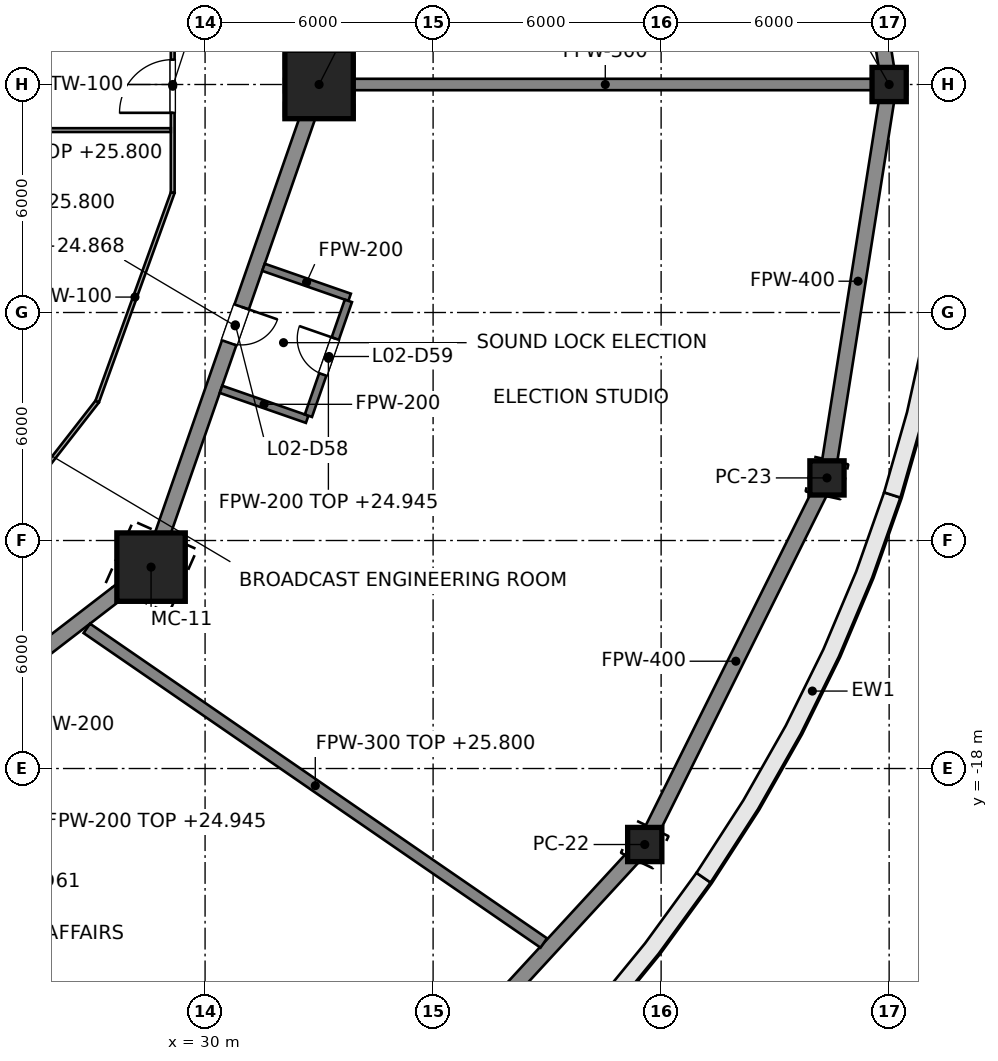
"""IFC4 building model, lengths in metres.
Left out: names, types, materials, properties, quantities, classifications, styles, units other than length and angle.
Written with IfcOpenShell. Run it as: python <this file> out.ifc"""

import sys

from ifc_helpers import new_model, si_unit, direction, frame, frame_2d, origin, origin_2d, place, context, subcontext, project, spatial, polyline, rectangle, hollow_rectangle, outline, extrude, element, fill, save


model = new_model("IFC4")
c1 = context("Model", 3, precision=1e-05, world=origin(), true_north=direction((0.0, 1.0)))
c2 = subcontext(c1, "Body", "Model", "MODEL_VIEW")
j1 = project(units=[si_unit("LENGTHUNIT", "METRE"), si_unit("PLANEANGLEUNIT", "RADIAN")], contexts=[c1])
p1 = place(None, origin())
s1 = spatial("IfcSite", under=j1, at=p1, CompositionType="ELEMENT")
p2 = place(p1, origin())
s2 = spatial("IfcBuilding", under=s1, at=p2, CompositionType="ELEMENT")
p3 = place(p2, frame((0.0, 0.0, 17.0)))
s3 = spatial("IfcBuildingStorey", under=s2, at=p3, CompositionType="ELEMENT", Elevation=17.0)
for number, where, z_axis, x_axis in (
    (1, (33.0, 0.0, 0.0), (0.0, 0.0, 1.0), (1.0, 0.0, 0.0)),
    (2, (28.579, -12.7, 0.0), (0.0, 0.0, 1.0), (0.914, -0.406, 0.0)),
):
    element("IfcColumn", number, at=place(p3, frame(where, z_axis=z_axis, x_axis=x_axis)), inside=s3, PredefinedType="COLUMN", context=c2, shape_type="SweptSolid", body=[
        extrude(hollow_rectangle(XDim=1.8, YDim=1.8, WallThickness=0.08, at=origin_2d()), origin(), (0.0, 0.0, 1.0), 9.0),
    ])
for number, where, z_axis, x_axis in (
    (3, (48.0, 0.0, 0.0), (0.0, 0.0, 1.0), (1.0, 0.0, 0.0)),
    (4, (41.569, -20.0, 0.0), (0.0, 0.0, 1.0), (0.901, -0.434, 0.0)),
    (5, (46.365, -10.353, 0.0), (0.0, 0.0, 1.0), (0.976, -0.218, 0.0)),
):
    element("IfcColumn", number, at=place(p3, frame(where, z_axis=z_axis, x_axis=x_axis)), inside=s3, PredefinedType="COLUMN", context=c2, shape_type="SweptSolid", body=[
        extrude(hollow_rectangle(XDim=0.9, YDim=0.9, WallThickness=0.04, at=origin_2d()), origin(), (0.0, 0.0, 1.0), 9.0),
    ])
p4 = place(p3, origin())
e6 = element("IfcWall", 6, at=p4, inside=s3, PredefinedType="SOLIDWALL", context=c2, shape_type="SweptSolid", body=[
    extrude(outline(polyline([(50.0, 0.0), (49.931, 2.198), (49.726, 4.39), (49.385, 6.57), (48.907, 8.732), (48.296, 10.87), (47.868, 10.734), (48.471, 8.622), (48.942, 6.487), (49.28, 4.334), (49.482, 2.17), (49.55, 0.0), (50.0, 0.0)])), origin(), (0.0, 0.0, 1.0), 8.8),
])
e7 = element("IfcWall", 7, at=p4, inside=s3, PredefinedType="SOLIDWALL", context=c2, shape_type="SweptSolid", body=[
    extrude(outline(polyline([(35.355, -29.698), (37.157, -28.104), (38.857, -26.431), (40.451, -24.687), (41.934, -22.875), (43.301, -21.0), (42.93, -20.745), (41.577, -22.6), (40.11, -24.393), (38.533, -26.119), (36.85, -27.774), (35.066, -29.354), (35.355, -29.698)])), origin(), (0.0, 0.0, 1.0), 8.8),
])
e8 = element("IfcWall", 8, at=p4, inside=s3, PredefinedType="SOLIDWALL", context=c2, shape_type="SweptSolid", body=[
    extrude(outline(polyline([(43.301, -21.0), (44.55, -19.068), (45.677, -17.083), (46.679, -15.052), (47.553, -12.979), (48.296, -10.87), (47.868, -10.734), (47.133, -12.816), (46.27, -14.865), (45.28, -16.872), (44.166, -18.834), (42.93, -20.745), (43.301, -21.0)])), origin(), (0.0, 0.0, 1.0), 8.8),
])
e9 = element("IfcWall", 9, at=p4, inside=s3, PredefinedType="SOLIDWALL", context=c2, shape_type="SweptSolid", body=[
    extrude(outline(polyline([(48.296, -10.87), (48.907, -8.732), (49.385, -6.57), (49.726, -4.39), (49.931, -2.198), (50.0, 0.0), (49.55, 0.0), (49.482, -2.17), (49.28, -4.334), (48.942, -6.487), (48.471, -8.622), (47.868, -10.734), (48.296, -10.87)])), origin(), (0.0, 0.0, 1.0), 8.8),
])
p5 = place(p3, frame((48.0, 0.0, 0.0), z_axis=(0.0, 0.0, 1.0), x_axis=(-0.156041518224, 0.987750497135, 0.0)))
e10 = element("IfcWall", 10, at=p5, inside=s3, PredefinedType="PARTITIONING", context=c2, shape_type="SweptSolid", body=[
    extrude(rectangle(XDim=10.481, YDim=0.4, at=frame_2d((5.241, 0.0))), origin(), (0.0, 0.0, 1.0), 7.877),
])
p6 = place(p3, frame((33.941, -28.284, 0.0), z_axis=(0.0, 0.0, 1.0), x_axis=(0.67736833065, 0.735644033914, 0.0)))
e11 = element("IfcWall", 11, at=p6, inside=s3, PredefinedType="PARTITIONING", context=c2, shape_type="SweptSolid", body=[
    extrude(rectangle(XDim=11.261, YDim=0.4, at=frame_2d((5.631, 0.0))), origin(), (0.0, 0.0, 1.0), 7.877),
])
p7 = place(p3, frame((41.569, -20.0, 0.0), z_axis=(0.0, 0.0, 1.0), x_axis=(0.445118441463, 0.895471704226, 0.0)))
e12 = element("IfcWall", 12, at=p7, inside=s3, PredefinedType="PARTITIONING", context=c2, shape_type="SweptSolid", body=[
    extrude(rectangle(XDim=10.773, YDim=0.4, at=frame_2d((5.387, 0.0))), origin(), (0.0, 0.0, 1.0), 7.877),
])
p8 = place(p3, frame((46.365, -10.353, 0.0), z_axis=(0.0, 0.0, 1.0), x_axis=(0.156041518224, 0.987750497135, 0.0)))
e13 = element("IfcWall", 13, at=p8, inside=s3, PredefinedType="PARTITIONING", context=c2, shape_type="SweptSolid", body=[
    extrude(rectangle(XDim=10.481, YDim=0.4, at=frame_2d((5.241, 0.0))), origin(), (0.0, 0.0, 1.0), 7.877),
])
p9 = place(p3, frame((33.0, 0.0, 0.0), z_axis=(0.0, 0.0, 1.0), x_axis=(-0.328770590399, 0.944409815117, 0.0)))
e14 = element("IfcWall", 14, at=p9, inside=s3, PredefinedType="PARTITIONING", context=c2, shape_type="SweptSolid", body=[
    extrude(rectangle(XDim=13.448, YDim=0.4, at=frame_2d((6.724, 0.0))), origin(), (0.0, 0.0, 1.0), 7.868),
])
p10 = place(p9, frame((6.25, 0.0, 0.0)))
e15 = element("IfcOpeningElement", 15, at=p10, cuts=e14, PredefinedType="OPENING", context=c2, shape_type="SweptSolid", body=[
    extrude(rectangle(XDim=1.0, YDim=2.1, at=frame_2d((0.5, 1.05))), frame((0.0, 0.2, 0.0), z_axis=(0.0, -1.0, 0.0), x_axis=(1.0, 0.0, 0.0)), (0.0, 0.0, 1.0), 0.4),
])
p11 = place(p3, frame((16.5, -21.997, 0.0), z_axis=(0.0, 0.0, 1.0), x_axis=(0.792443539308, 0.609945273782, 0.0)))
e16 = element("IfcWall", 16, at=p11, inside=s3, PredefinedType="PARTITIONING", context=c2, shape_type="SweptSolid", body=[
    extrude(rectangle(XDim=15.242, YDim=0.4, at=frame_2d((7.621, 0.0))), origin(), (0.0, 0.0, 1.0), 7.868),
])
p12 = place(p11, frame((7.15, 0.0, 0.0)))
e17 = element("IfcOpeningElement", 17, at=p12, cuts=e16, PredefinedType="OPENING", context=c2, shape_type="SweptSolid", body=[
    extrude(rectangle(XDim=1.0, YDim=2.1, at=frame_2d((0.5, 1.05))), frame((0.0, 0.2, 0.0), z_axis=(0.0, -1.0, 0.0), x_axis=(1.0, 0.0, 0.0)), (0.0, 0.0, 1.0), 0.4),
])
p13 = place(p3, frame((28.579, -12.7, 0.0), z_axis=(0.0, 0.0, 1.0), x_axis=(0.328770590399, 0.944409815117, 0.0)))
e18 = element("IfcWall", 18, at=p13, inside=s3, PredefinedType="PARTITIONING", context=c2, shape_type="SweptSolid", body=[
    extrude(rectangle(XDim=13.448, YDim=0.4, at=frame_2d((6.724, 0.0))), origin(), (0.0, 0.0, 1.0), 7.868),
])
p14 = place(p13, frame((6.25, 0.0, 0.0)))
e19 = element("IfcOpeningElement", 19, at=p14, cuts=e18, PredefinedType="OPENING", context=c2, shape_type="SweptSolid", body=[
    extrude(rectangle(XDim=1.0, YDim=2.1, at=frame_2d((0.5, 1.05))), frame((0.0, 0.2, 0.0), z_axis=(0.0, -1.0, 0.0), x_axis=(1.0, 0.0, 0.0)), (0.0, 0.0, 1.0), 0.4),
])
p15 = place(p3, frame((23.325, -13.271, 0.0), z_axis=(0.0, 0.0, 1.0), x_axis=(0.614354540541, 0.78903009988, 0.0)))
e20 = element("IfcWall", 20, at=p15, inside=s3, PredefinedType="PARTITIONING", context=c2, shape_type="SweptSolid", body=[
    extrude(rectangle(XDim=6.246, YDim=0.1, at=frame_2d((3.123, 0.0))), origin(), (0.0, 0.0, 1.0), 7.945),
])
p16 = place(p3, frame((27.162, -8.343, 0.0), z_axis=(0.0, 0.0, 1.0), x_axis=(0.339837423604, 0.940484197378, 0.0)))
e21 = element("IfcWall", 21, at=p16, inside=s3, PredefinedType="PARTITIONING", context=c2, shape_type="SweptSolid", body=[
    extrude(rectangle(XDim=5.845, YDim=0.1, at=frame_2d((2.922, 0.0))), origin(), (0.0, 0.0, 1.0), 7.877),
])
p17 = place(p3, frame((29.148, -2.845, 0.0), z_axis=(0.0, 0.0, 1.0), x_axis=(0.0, 1.0, 0.0)))
e22 = element("IfcWall", 22, at=p17, inside=s3, PredefinedType="PARTITIONING", context=c2, shape_type="SweptSolid", body=[
    extrude(rectangle(XDim=5.691, YDim=0.1, at=frame_2d((2.845, 0.0))), origin(), (0.0, 0.0, 1.0), 7.877),
])
p18 = place(p17, frame((2.1, 0.0, 0.0)))
e23 = element("IfcOpeningElement", 23, at=p18, cuts=e22, PredefinedType="OPENING", context=c2, shape_type="SweptSolid", body=[
    extrude(rectangle(XDim=1.4, YDim=2.1, at=frame_2d((0.7, 1.05))), frame((0.0, 0.05, 0.0), z_axis=(0.0, -1.0, 0.0), x_axis=(1.0, 0.0, 0.0)), (0.0, 0.0, 1.0), 0.1),
])
p19 = place(p3, frame((18.05, -1.2, 0.0), z_axis=(0.0, 0.0, 1.0), x_axis=(1.0, 0.0, 0.0)))
e24 = element("IfcWall", 24, at=p19, inside=s3, PredefinedType="PARTITIONING", context=c2, shape_type="SweptSolid", body=[
    extrude(rectangle(XDim=11.048, YDim=0.1, at=frame_2d((5.524, 0.0))), origin(), (0.0, 0.0, 1.0), 8.8),
])
p20 = place(p3, frame((33.264, 0.0, 0.0), z_axis=(0.0, 0.0, 1.0), x_axis=(1.0, 0.0, 0.0)))
e25 = element("IfcWall", 25, at=p20, inside=s3, PredefinedType="PARTITIONING", context=c2, shape_type="SweptSolid", body=[
    extrude(rectangle(XDim=14.534, YDim=0.3, at=frame_2d((7.267, 0.0))), origin(), (0.0, 0.0, 1.0), 8.026),
])
p21 = place(p3, frame((26.888, -14.312, 0.0), z_axis=(0.0, 0.0, 1.0), x_axis=(0.823646474485, -0.567103592889, 0.0)))
e26 = element("IfcWall", 26, at=p21, inside=s3, PredefinedType="PARTITIONING", context=c2, shape_type="SweptSolid", body=[
    extrude(rectangle(XDim=14.598, YDim=0.3, at=frame_2d((7.299, 0.0))), origin(), (0.0, 0.0, 1.0), 8.8),
])
for number, where, z_axis, x_axis in (
    (27, (30.419, -8.021, 0.0), (0.0, 0.0, 1.0), (0.944, -0.329, 0.0)),
    (28, (31.537, -4.81, 0.0), (0.0, 0.0, 1.0), (0.944, -0.329, 0.0)),
):
    element("IfcWall", number, at=place(p3, frame(where, z_axis=z_axis, x_axis=x_axis)), inside=s3, PredefinedType="PARTITIONING", context=c2, shape_type="SweptSolid", body=[
        extrude(rectangle(XDim=2.4, YDim=0.2, at=frame_2d((1.2, 0.0))), origin(), (0.0, 0.0, 1.0), 8.8),
    ])
p22 = place(p3, frame((32.719, -8.716, 0.0), z_axis=(0.0, 0.0, 1.0), x_axis=(0.328742544754, 0.944419577978, 0.0)))
e29 = element("IfcWall", 29, at=p22, inside=s3, PredefinedType="PARTITIONING", context=c2, shape_type="SweptSolid", body=[
    extrude(rectangle(XDim=3.2, YDim=0.2, at=frame_2d((1.6, 0.0))), origin(), (0.0, 0.0, 1.0), 7.945),
])
p23 = place(p22, frame((1.15, 0.0, 0.0)))
e30 = element("IfcOpeningElement", 30, at=p23, cuts=e29, PredefinedType="OPENING", context=c2, shape_type="SweptSolid", body=[
    extrude(rectangle(XDim=1.0, YDim=2.1, at=frame_2d((0.5, 1.05))), frame((0.0, 0.1, 0.0), z_axis=(0.0, -1.0, 0.0), x_axis=(1.0, 0.0, 0.0)), (0.0, 0.0, 1.0), 0.2),
])
p24 = place(p18, origin())
e31 = element("IfcDoor", 31, at=p24, inside=s3, OperationType="SINGLE_SWING_LEFT", PredefinedType="DOOR", context=c2, shape_type="SweptSolid", body=[
    extrude(rectangle(XDim=1.4, YDim=2.1, at=frame_2d((0.7, 1.05))), frame((0.0, 0.025, 0.0), z_axis=(0.0, -1.0, 0.0), x_axis=(1.0, 0.0, 0.0)), (0.0, 0.0, 1.0), 0.05),
])
fill(e23, e31)
p25 = place(p14, origin())
e32 = element("IfcDoor", 32, at=p25, inside=s3, OperationType="SINGLE_SWING_RIGHT", PredefinedType="DOOR", context=c2, shape_type="SweptSolid", body=[
    extrude(rectangle(XDim=1.0, YDim=2.1, at=frame_2d((0.5, 1.05))), frame((0.0, 0.025, 0.0), z_axis=(0.0, -1.0, 0.0), x_axis=(1.0, 0.0, 0.0)), (0.0, 0.0, 1.0), 0.05),
])
fill(e19, e32)
p26 = place(p23, origin())
e33 = element("IfcDoor", 33, at=p26, inside=s3, OperationType="SINGLE_SWING_RIGHT", PredefinedType="DOOR", context=c2, shape_type="SweptSolid", body=[
    extrude(rectangle(XDim=1.0, YDim=2.1, at=frame_2d((0.5, 1.05))), frame((0.0, 0.025, 0.0), z_axis=(0.0, -1.0, 0.0), x_axis=(1.0, 0.0, 0.0)), (0.0, 0.0, 1.0), 0.05),
])
fill(e30, e33)
save(model, sys.argv[1])
